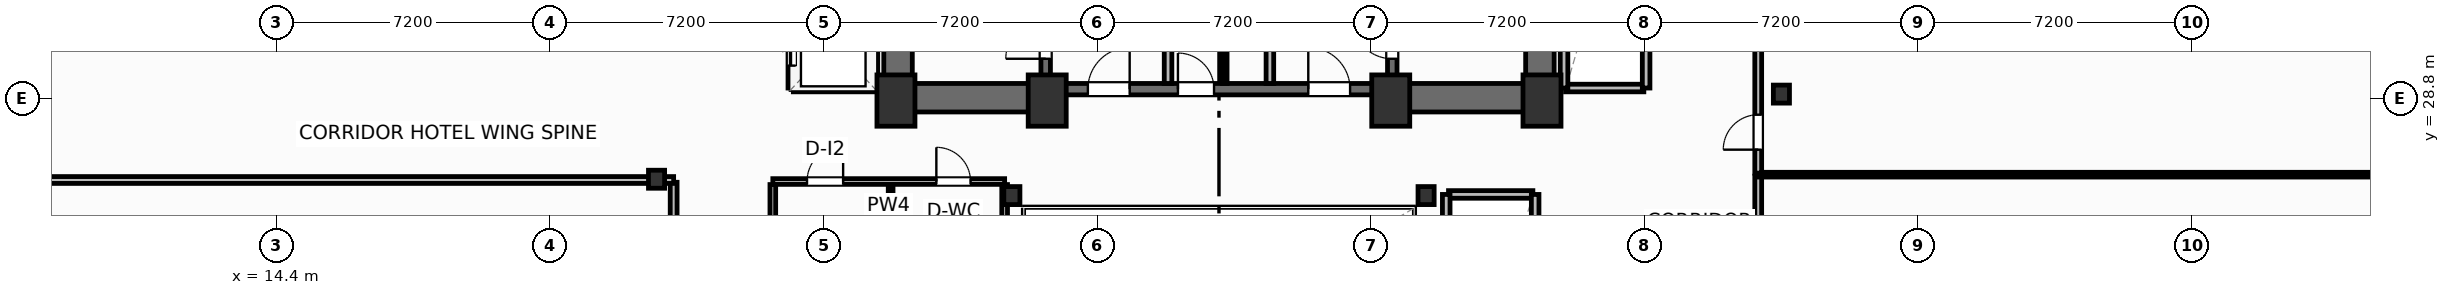
"""IFC4 building model, lengths in metres.
Left out: names, types, materials, properties, quantities, classifications, styles, units other than length and angle.
Written with IfcOpenShell. Run it as: python <this file> out.ifc"""

import sys

from ifc_helpers import new_model, si_unit, direction, frame, frame_2d, origin, origin_2d, place, context, subcontext, project, spatial, rectangle, i_section, extrude, element, fill, save


model = new_model("IFC4")
c1 = context("Model", 3, precision=1e-05, world=origin(), true_north=direction((0.0, 1.0)))
c2 = subcontext(c1, "Body", "Model", "MODEL_VIEW")
j1 = project(units=[si_unit("LENGTHUNIT", "METRE"), si_unit("PLANEANGLEUNIT", "RADIAN")], contexts=[c1])
p1 = place(None, origin())
s1 = spatial("IfcSite", under=j1, at=p1, CompositionType="ELEMENT")
p2 = place(p1, origin())
s2 = spatial("IfcBuilding", under=s1, at=p2, CompositionType="ELEMENT")
p3 = place(p2, frame((0.0, 0.0, 105.8)))
s3 = spatial("IfcBuildingStorey", under=s2, at=p3, CompositionType="ELEMENT", Elevation=105.8)
for number, where, z_axis, x_axis in (
    (1, (30.7, 28.75, 0.0), (0.0, 0.0, 1.0), (1.0, 0.0, 0.0)),
    (2, (34.68, 28.75, 0.0), (0.0, 0.0, 1.0), (1.0, 0.0, 0.0)),
    (3, (43.72, 28.75, 0.0), (0.0, 0.0, 1.0), (1.0, 0.0, 0.0)),
    (4, (47.7, 28.75, 0.0), (0.0, 0.0, 1.0), (1.0, 0.0, 0.0)),
):
    element("IfcColumn", number, at=place(p3, frame(where, z_axis=z_axis, x_axis=x_axis)), inside=s3, PredefinedType="COLUMN", context=c2, shape_type="SweptSolid", body=[
        extrude(rectangle(XDim=1.0, YDim=1.35, at=origin_2d()), origin(), (0.0, 0.0, 1.0), 3.7),
    ])
for number, where, z_axis, x_axis in (
    (5, (33.75, 26.25, 0.0), (0.0, 0.0, 1.0), (1.0, 0.0, 0.0)),
    (6, (44.65, 26.25, 0.0), (0.0, 0.0, 1.0), (1.0, 0.0, 0.0)),
    (7, (24.4, 26.68, 0.0), (0.0, 0.0, 1.0), (1.0, 0.0, 0.0)),
    (8, (54.0, 28.92, 0.0), (0.0, 0.0, 1.0), (1.0, 0.0, 0.0)),
):
    element("IfcColumn", number, at=place(p3, frame(where, z_axis=z_axis, x_axis=x_axis)), inside=s3, PredefinedType="COLUMN", context=c2, shape_type="SweptSolid", body=[
        extrude(i_section(OverallWidth=0.424, OverallDepth=0.474, WebThickness=0.048, FlangeThickness=0.077, FilletRadius=0.025, at=origin_2d()), origin(), (0.0, 0.0, 1.0), 3.7),
    ])
for number, where, z_axis, x_axis in (
    (9, (30.755, 29.2, 0.0), (0.0, 0.0, 1.0), (0.0, 1.0, 0.0)),
    (10, (47.645, 29.2, 0.0), (0.0, 0.0, 1.0), (0.0, 1.0, 0.0)),
):
    element("IfcWall", number, at=place(p3, frame(where, z_axis=z_axis, x_axis=x_axis)), inside=s3, PredefinedType="SHEAR", context=c2, shape_type="SweptSolid", body=[
        extrude(rectangle(XDim=9.22, YDim=0.75, at=frame_2d((4.61, 0.0))), origin(), (0.0, 0.0, 1.0), 3.45),
    ])
p4 = place(p3, frame((30.38, 28.825, 0.0), z_axis=(0.0, 0.0, 1.0), x_axis=(1.0, 0.0, 0.0)))
e11 = element("IfcWall", 11, at=p4, inside=s3, PredefinedType="SHEAR", context=c2, shape_type="SweptSolid", body=[
    extrude(rectangle(XDim=4.42, YDim=0.75, at=frame_2d((2.21, 0.0))), origin(), (0.0, 0.0, 1.0), 3.45),
])
p5 = place(p3, frame((43.6, 28.825, 0.0), z_axis=(0.0, 0.0, 1.0), x_axis=(1.0, 0.0, 0.0)))
e12 = element("IfcWall", 12, at=p5, inside=s3, PredefinedType="SHEAR", context=c2, shape_type="SweptSolid", body=[
    extrude(rectangle(XDim=4.42, YDim=0.75, at=frame_2d((2.21, 0.0))), origin(), (0.0, 0.0, 1.0), 3.45),
])
p6 = place(p3, frame((34.8, 29.05, 0.0), z_axis=(0.0, 0.0, 1.0), x_axis=(1.0, 0.0, 0.0)))
e13 = element("IfcWall", 13, at=p6, inside=s3, PredefinedType="SHEAR", context=c2, shape_type="SweptSolid", body=[
    extrude(rectangle(XDim=8.8, YDim=0.3, at=frame_2d((4.4, 0.0))), origin(), (0.0, 0.0, 1.0), 3.45),
])
p7 = place(p6, frame((0.95, 0.0, 0.0)))
e14 = element("IfcOpeningElement", 14, at=p7, cuts=e13, PredefinedType="OPENING", context=c2, shape_type="SweptSolid", body=[
    extrude(rectangle(XDim=1.1, YDim=2.15, at=frame_2d((0.55, 1.075))), frame((0.0, 0.16, 0.0), z_axis=(0.0, -1.0, 0.0), x_axis=(1.0, 0.0, 0.0)), (0.0, 0.0, 1.0), 0.32),
])
p8 = place(p6, frame((6.75, 0.0, 0.0)))
e15 = element("IfcOpeningElement", 15, at=p8, cuts=e13, PredefinedType="OPENING", context=c2, shape_type="SweptSolid", body=[
    extrude(rectangle(XDim=1.1, YDim=2.15, at=frame_2d((0.55, 1.075))), frame((0.0, 0.16, 0.0), z_axis=(0.0, -1.0, 0.0), x_axis=(1.0, 0.0, 0.0)), (0.0, 0.0, 1.0), 0.32),
])
p9 = place(p6, frame((3.32, 0.0, 0.0)))
e16 = element("IfcOpeningElement", 16, at=p9, cuts=e13, PredefinedType="OPENING", context=c2, shape_type="SweptSolid", body=[
    extrude(rectangle(XDim=0.95, YDim=2.15, at=frame_2d((0.475, 1.075))), frame((0.0, 0.16, 0.0), z_axis=(0.0, -1.0, 0.0), x_axis=(1.0, 0.0, 0.0)), (0.0, 0.0, 1.0), 0.32),
])
p10 = place(p3, frame((34.64, 29.2, 0.0), z_axis=(0.0, 0.0, 1.0), x_axis=(0.0, 1.0, 0.0)))
e17 = element("IfcWall", 17, at=p10, inside=s3, PredefinedType="SHEAR", context=c2, shape_type="SweptSolid", body=[
    extrude(rectangle(XDim=9.22, YDim=0.25, at=frame_2d((4.61, 0.0))), origin(), (0.0, 0.0, 1.0), 3.45),
])
p11 = place(p10, frame((0.65, 0.0, 0.0)))
e18 = element("IfcOpeningElement", 18, at=p11, cuts=e17, PredefinedType="OPENING", context=c2, shape_type="SweptSolid", body=[
    extrude(rectangle(XDim=1.05, YDim=2.15, at=frame_2d((0.525, 1.075))), frame((0.0, 0.135, 0.0), z_axis=(0.0, -1.0, 0.0), x_axis=(1.0, 0.0, 0.0)), (0.0, 0.0, 1.0), 0.27),
])
p12 = place(p3, frame((43.76, 29.2, 0.0), z_axis=(0.0, 0.0, 1.0), x_axis=(0.0, 1.0, 0.0)))
e19 = element("IfcWall", 19, at=p12, inside=s3, PredefinedType="SHEAR", context=c2, shape_type="SweptSolid", body=[
    extrude(rectangle(XDim=9.22, YDim=0.25, at=frame_2d((4.61, 0.0))), origin(), (0.0, 0.0, 1.0), 3.45),
])
p13 = place(p12, frame((0.65, 0.0, 0.0)))
e20 = element("IfcOpeningElement", 20, at=p13, cuts=e19, PredefinedType="OPENING", context=c2, shape_type="SweptSolid", body=[
    extrude(rectangle(XDim=1.05, YDim=2.15, at=frame_2d((0.525, 1.075))), frame((0.0, 0.135, 0.0), z_axis=(0.0, -1.0, 0.0), x_axis=(1.0, 0.0, 0.0)), (0.0, 0.0, 1.0), 0.27),
])
p14 = place(p3, frame((24.85, 23.03, 0.0), z_axis=(0.0, 0.0, 1.0), x_axis=(0.0, 1.0, 0.0)))
e21 = element("IfcWall", 21, at=p14, inside=s3, PredefinedType="PARTITIONING", context=c2, shape_type="SweptSolid", body=[
    extrude(rectangle(XDim=3.57, YDim=0.18, at=frame_2d((1.785, 0.0))), origin(), (0.0, 0.0, 1.0), 3.45),
])
p15 = place(p14, frame((1.5, 0.0, 0.0)))
e22 = element("IfcOpeningElement", 22, at=p15, cuts=e21, PredefinedType="OPENING", context=c2, shape_type="SweptSolid", body=[
    extrude(rectangle(XDim=0.92, YDim=2.05, at=frame_2d((0.46, 1.025))), frame((0.0, 0.1, 0.0), z_axis=(0.0, -1.0, 0.0), x_axis=(1.0, 0.0, 0.0)), (0.0, 0.0, 1.0), 0.2),
])
p16 = place(p3, frame((-0.086, 26.66, 0.0), z_axis=(0.0, 0.0, 1.0), x_axis=(1.0, 0.0, 0.0)))
e23 = element("IfcWall", 23, at=p16, inside=s3, PredefinedType="PARTITIONING", context=c2, shape_type="SweptSolid", body=[
    extrude(rectangle(XDim=24.936, YDim=0.18, at=frame_2d((12.468, 0.0))), origin(), (0.0, 0.0, 1.0), 2.662),
])
p17 = place(p3, frame((53.39, 19.24, 0.0), z_axis=(0.0, 0.0, 1.0), x_axis=(0.0, 1.0, 0.0)))
e24 = element("IfcWall", 24, at=p17, inside=s3, PredefinedType="PARTITIONING", context=c2, shape_type="SweptSolid", body=[
    extrude(rectangle(XDim=7.52, YDim=0.18, at=frame_2d((3.76, 0.0))), origin(), (0.0, 0.0, 1.0), 3.45),
])
p18 = place(p17, frame((2.1, 0.0, 0.0)))
e25 = element("IfcOpeningElement", 25, at=p18, cuts=e24, PredefinedType="OPENING", context=c2, shape_type="SweptSolid", body=[
    extrude(rectangle(XDim=0.92, YDim=2.05, at=frame_2d((0.46, 1.025))), frame((0.0, 0.1, 0.0), z_axis=(0.0, -1.0, 0.0), x_axis=(1.0, 0.0, 0.0)), (0.0, 0.0, 1.0), 0.2),
])
p19 = place(p3, frame((53.39, 26.8, 0.0), z_axis=(0.0, 0.0, 1.0), x_axis=(1.0, 0.0, 0.0)))
e26 = element("IfcWall", 26, at=p19, inside=s3, PredefinedType="PARTITIONING", context=c2, shape_type="SweptSolid", body=[
    extrude(rectangle(XDim=23.61, YDim=0.125, at=frame_2d((11.805, 0.0))), origin(), (0.0, 0.0, 1.0), 3.45),
])
p20 = place(p3, frame((53.39, 26.84, 0.0), z_axis=(0.0, 0.0, 1.0), x_axis=(0.0, 1.0, 0.0)))
e27 = element("IfcWall", 27, at=p20, inside=s3, PredefinedType="PARTITIONING", context=c2, shape_type="SweptSolid", body=[
    extrude(rectangle(XDim=12.46, YDim=0.18, at=frame_2d((6.23, 0.0))), origin(), (0.0, 0.0, 1.0), 3.45),
])
p21 = place(p20, frame((0.618, 0.0, 0.0)))
e28 = element("IfcOpeningElement", 28, at=p21, cuts=e27, PredefinedType="OPENING", context=c2, shape_type="SweptSolid", body=[
    extrude(rectangle(XDim=0.92, YDim=2.05, at=frame_2d((0.46, 1.025))), frame((0.0, 0.1, 0.0), z_axis=(0.0, -1.0, 0.0), x_axis=(1.0, 0.0, 0.0)), (0.0, 0.0, 1.0), 0.2),
])
for number, where, z_axis, x_axis in (
    (29, (37.86, 29.2, 0.0), (0.0, 0.0, 1.0), (0.0, 1.0, 0.0)),
    (30, (40.54, 29.2, 0.0), (0.0, 0.0, 1.0), (0.0, 1.0, 0.0)),
):
    element("IfcWall", number, at=place(p3, frame(where, z_axis=z_axis, x_axis=x_axis)), inside=s3, PredefinedType="PARTITIONING", context=c2, shape_type="SweptSolid", body=[
        extrude(rectangle(XDim=5.18, YDim=0.2, at=frame_2d((2.59, 0.0))), origin(), (0.0, 0.0, 1.0), 3.45),
    ])
p22 = place(p3, frame((39.35, 29.2, 0.0), z_axis=(0.0, 0.0, 1.0), x_axis=(0.0, 1.0, 0.0)))
e31 = element("IfcWall", 31, at=p22, inside=s3, PredefinedType="PARTITIONING", context=c2, shape_type="SweptSolid", body=[
    extrude(rectangle(XDim=5.22, YDim=0.125, at=frame_2d((2.61, 0.0))), origin(), (0.0, 0.0, 1.0), 3.45),
])
p23 = place(p22, frame((2.05, 0.0, 0.0)))
e32 = element("IfcOpeningElement", 32, at=p23, cuts=e31, PredefinedType="OPENING", context=c2, shape_type="SweptSolid", body=[
    extrude(rectangle(XDim=0.85, YDim=2.05, at=frame_2d((0.425, 1.025))), frame((0.0, 0.073, 0.0), z_axis=(0.0, -1.0, 0.0), x_axis=(1.0, 0.0, 0.0)), (0.0, 0.0, 1.0), 0.145),
])
p24 = place(p3, frame((27.46, 26.62, 0.0), z_axis=(0.0, 0.0, 1.0), x_axis=(1.0, 0.0, 0.0)))
e33 = element("IfcWall", 33, at=p24, inside=s3, PredefinedType="PARTITIONING", context=c2, shape_type="SweptSolid", body=[
    extrude(rectangle(XDim=6.1, YDim=0.15, at=frame_2d((3.05, 0.0))), origin(), (0.0, 0.0, 1.0), 2.662),
])
p25 = place(p24, frame((0.9, 0.0, 0.0)))
e34 = element("IfcOpeningElement", 34, at=p25, cuts=e33, PredefinedType="OPENING", context=c2, shape_type="SweptSolid", body=[
    extrude(rectangle(XDim=0.95, YDim=2.05, at=frame_2d((0.475, 1.025))), frame((0.0, 0.085, 0.0), z_axis=(0.0, -1.0, 0.0), x_axis=(1.0, 0.0, 0.0)), (0.0, 0.0, 1.0), 0.17),
])
p26 = place(p24, frame((4.303, 0.0, 0.0)))
e35 = element("IfcOpeningElement", 35, at=p26, cuts=e33, PredefinedType="OPENING", context=c2, shape_type="SweptSolid", body=[
    extrude(rectangle(XDim=0.9, YDim=2.05, at=frame_2d((0.45, 1.025))), frame((0.0, 0.085, 0.0), z_axis=(0.0, -1.0, 0.0), x_axis=(1.0, 0.0, 0.0)), (0.0, 0.0, 1.0), 0.17),
])
p27 = place(p3, frame((30.56, 19.38, 0.0), z_axis=(0.0, 0.0, 1.0), x_axis=(0.0, 1.0, 0.0)))
e36 = element("IfcWall", 36, at=p27, inside=s3, PredefinedType="PARTITIONING", context=c2, shape_type="SweptSolid", body=[
    extrude(rectangle(XDim=7.16, YDim=0.125, at=frame_2d((3.58, 0.0))), origin(), (0.0, 0.0, 1.0), 3.45),
])
p28 = place(p27, frame((1.4, 0.0, 0.0)))
e37 = element("IfcOpeningElement", 37, at=p28, cuts=e36, PredefinedType="OPENING", context=c2, shape_type="SweptSolid", body=[
    extrude(rectangle(XDim=0.92, YDim=2.05, at=frame_2d((0.46, 1.025))), frame((0.0, 0.073, 0.0), z_axis=(0.0, -1.0, 0.0), x_axis=(1.0, 0.0, 0.0)), (0.0, 0.0, 1.0), 0.145),
])
p29 = place(p3, frame((27.46, 19.38, 0.0), z_axis=(0.0, 0.0, 1.0), x_axis=(0.0, 1.0, 0.0)))
e38 = element("IfcWall", 38, at=p29, inside=s3, PredefinedType="PARTITIONING", context=c2, shape_type="SweptSolid", body=[
    extrude(rectangle(XDim=7.16, YDim=0.15, at=frame_2d((3.58, 0.0))), origin(), (0.0, 0.0, 1.0), 3.45),
])
p30 = place(p3, frame((33.56, 19.38, 0.0), z_axis=(0.0, 0.0, 1.0), x_axis=(0.0, 1.0, 0.0)))
e39 = element("IfcWall", 39, at=p30, inside=s3, PredefinedType="PARTITIONING", context=c2, shape_type="SweptSolid", body=[
    extrude(rectangle(XDim=7.16, YDim=0.15, at=frame_2d((3.58, 0.0))), origin(), (0.0, 0.0, 1.0), 2.824),
])
p31 = place(p3, frame((28.0, 29.08, 0.0), z_axis=(0.0, 0.0, 1.0), x_axis=(1.0, 0.0, 0.0)))
e40 = element("IfcWall", 40, at=p31, inside=s3, PredefinedType="PARTITIONING", context=c2, shape_type="SweptSolid", body=[
    extrude(rectangle(XDim=2.1, YDim=0.2, at=frame_2d((1.05, 0.0))), origin(), (0.0, 0.0, 1.0), 3.45),
])
p32 = place(p3, frame((30.12, 29.08, 0.0), z_axis=(0.0, 0.0, 1.0), x_axis=(0.0, 1.0, 0.0)))
e41 = element("IfcWall", 41, at=p32, inside=s3, PredefinedType="PARTITIONING", context=c2, shape_type="SweptSolid", body=[
    extrude(rectangle(XDim=6.89, YDim=0.2, at=frame_2d((3.445, 0.0))), origin(), (0.0, 0.0, 1.0), 3.45),
])
p33 = place(p3, frame((27.96, 29.08, 0.0), z_axis=(0.0, 0.0, 1.0), x_axis=(0.0, 1.0, 0.0)))
e42 = element("IfcWall", 42, at=p33, inside=s3, PredefinedType="PARTITIONING", context=c2, shape_type="SweptSolid", body=[
    extrude(rectangle(XDim=6.89, YDim=0.2, at=frame_2d((3.445, 0.0))), origin(), (0.0, 0.0, 1.0), 3.45),
])
p34 = place(p33, frame((0.59, 0.0, 0.0)))
e43 = element("IfcOpeningElement", 43, at=p34, cuts=e42, PredefinedType="OPENING", context=c2, shape_type="SweptSolid", body=[
    extrude(rectangle(XDim=1.1, YDim=2.15, at=frame_2d((0.55, 1.075))), frame((0.0, 0.11, 0.0), z_axis=(0.0, -1.0, 0.0), x_axis=(1.0, 0.0, 0.0)), (0.0, 0.0, 1.0), 0.22),
])
p35 = place(p33, frame((2.89, 0.0, 0.0)))
e44 = element("IfcOpeningElement", 44, at=p35, cuts=e42, PredefinedType="OPENING", context=c2, shape_type="SweptSolid", body=[
    extrude(rectangle(XDim=1.1, YDim=2.15, at=frame_2d((0.55, 1.075))), frame((0.0, 0.11, 0.0), z_axis=(0.0, -1.0, 0.0), x_axis=(1.0, 0.0, 0.0)), (0.0, 0.0, 1.0), 0.22),
])
p36 = place(p33, frame((5.19, 0.0, 0.0)))
e45 = element("IfcOpeningElement", 45, at=p36, cuts=e42, PredefinedType="OPENING", context=c2, shape_type="SweptSolid", body=[
    extrude(rectangle(XDim=1.1, YDim=2.15, at=frame_2d((0.55, 1.075))), frame((0.0, 0.11, 0.0), z_axis=(0.0, -1.0, 0.0), x_axis=(1.0, 0.0, 0.0)), (0.0, 0.0, 1.0), 0.22),
])
p37 = place(p3, frame((48.32, 29.08, 0.0), z_axis=(0.0, 0.0, 1.0), x_axis=(1.0, 0.0, 0.0)))
e46 = element("IfcWall", 46, at=p37, inside=s3, PredefinedType="PARTITIONING", context=c2, shape_type="SweptSolid", body=[
    extrude(rectangle(XDim=2.06, YDim=0.2, at=frame_2d((1.03, 0.0))), origin(), (0.0, 0.0, 1.0), 2.662),
])
for number, where, z_axis, x_axis in (
    (47, (48.28, 29.08, 0.0), (0.0, 0.0, 1.0), (0.0, 1.0, 0.0)),
    (48, (50.44, 29.08, 0.0), (0.0, 0.0, 1.0), (0.0, 1.0, 0.0)),
):
    element("IfcWall", number, at=place(p3, frame(where, z_axis=z_axis, x_axis=x_axis)), inside=s3, PredefinedType="PARTITIONING", context=c2, shape_type="SweptSolid", body=[
        extrude(rectangle(XDim=6.89, YDim=0.2, at=frame_2d((3.445, 0.0))), origin(), (0.0, 0.0, 1.0), 3.45),
    ])
p38 = place(p3, frame((45.24, 26.28, 0.0), z_axis=(0.0, 0.0, 1.0), x_axis=(1.0, 0.0, 0.0)))
e49 = element("IfcWall", 49, at=p38, inside=s3, PredefinedType="PARTITIONING", context=c2, shape_type="SweptSolid", body=[
    extrude(rectangle(XDim=2.22, YDim=0.2, at=frame_2d((1.11, 0.0))), origin(), (0.0, 0.0, 1.0), 3.45),
])
for number, where, z_axis, x_axis in (
    (50, (45.18, 19.38, 0.0), (0.0, 0.0, 1.0), (0.0, 1.0, 0.0)),
    (51, (47.52, 19.38, 0.0), (0.0, 0.0, 1.0), (0.0, 1.0, 0.0)),
):
    element("IfcWall", number, at=place(p3, frame(where, z_axis=z_axis, x_axis=x_axis)), inside=s3, PredefinedType="PARTITIONING", context=c2, shape_type="SweptSolid", body=[
        extrude(rectangle(XDim=6.9, YDim=0.2, at=frame_2d((3.45, 0.0))), origin(), (0.0, 0.0, 1.0), 3.45),
    ])
p39 = place(p21, origin())
e52 = element("IfcDoor", 52, at=p39, inside=s3, OperationType="SINGLE_SWING_LEFT", PredefinedType="DOOR", context=c2, shape_type="SweptSolid", body=[
    extrude(rectangle(XDim=0.92, YDim=2.05, at=frame_2d((0.46, 1.025))), frame((0.0, 0.025, 0.0), z_axis=(0.0, -1.0, 0.0), x_axis=(1.0, 0.0, 0.0)), (0.0, 0.0, 1.0), 0.05),
])
fill(e28, e52)
p40 = place(p11, origin())
e53 = element("IfcDoor", 53, at=p40, inside=s3, OperationType="SINGLE_SWING_LEFT", PredefinedType="DOOR", context=c2, shape_type="SweptSolid", body=[
    extrude(rectangle(XDim=1.05, YDim=2.15, at=frame_2d((0.525, 1.075))), frame((0.0, 0.025, 0.0), z_axis=(0.0, -1.0, 0.0), x_axis=(1.0, 0.0, 0.0)), (0.0, 0.0, 1.0), 0.05),
])
fill(e18, e53)
p41 = place(p13, origin())
e54 = element("IfcDoor", 54, at=p41, inside=s3, OperationType="SINGLE_SWING_RIGHT", PredefinedType="DOOR", context=c2, shape_type="SweptSolid", body=[
    extrude(rectangle(XDim=1.05, YDim=2.15, at=frame_2d((0.525, 1.075))), frame((0.0, 0.025, 0.0), z_axis=(0.0, -1.0, 0.0), x_axis=(1.0, 0.0, 0.0)), (0.0, 0.0, 1.0), 0.05),
])
fill(e20, e54)
p42 = place(p7, origin())
e55 = element("IfcDoor", 55, at=p42, inside=s3, OperationType="SINGLE_SWING_RIGHT", PredefinedType="DOOR", context=c2, shape_type="SweptSolid", body=[
    extrude(rectangle(XDim=1.1, YDim=2.15, at=frame_2d((0.55, 1.075))), frame((0.0, 0.025, 0.0), z_axis=(0.0, -1.0, 0.0), x_axis=(1.0, 0.0, 0.0)), (0.0, 0.0, 1.0), 0.05),
])
fill(e14, e55)
p43 = place(p8, origin())
e56 = element("IfcDoor", 56, at=p43, inside=s3, OperationType="SINGLE_SWING_LEFT", PredefinedType="DOOR", context=c2, shape_type="SweptSolid", body=[
    extrude(rectangle(XDim=1.1, YDim=2.15, at=frame_2d((0.55, 1.075))), frame((0.0, 0.025, 0.0), z_axis=(0.0, -1.0, 0.0), x_axis=(1.0, 0.0, 0.0)), (0.0, 0.0, 1.0), 0.05),
])
fill(e15, e56)
p44 = place(p9, origin())
e57 = element("IfcDoor", 57, at=p44, inside=s3, OperationType="SINGLE_SWING_LEFT", PredefinedType="DOOR", context=c2, shape_type="SweptSolid", body=[
    extrude(rectangle(XDim=0.95, YDim=2.15, at=frame_2d((0.475, 1.075))), frame((0.0, 0.025, 0.0), z_axis=(0.0, -1.0, 0.0), x_axis=(1.0, 0.0, 0.0)), (0.0, 0.0, 1.0), 0.05),
])
fill(e16, e57)
p45 = place(p25, origin())
e58 = element("IfcDoor", 58, at=p45, inside=s3, OperationType="SINGLE_SWING_RIGHT", PredefinedType="DOOR", context=c2, shape_type="SweptSolid", body=[
    extrude(rectangle(XDim=0.95, YDim=2.05, at=frame_2d((0.475, 1.025))), frame((0.0, 0.025, 0.0), z_axis=(0.0, -1.0, 0.0), x_axis=(1.0, 0.0, 0.0)), (0.0, 0.0, 1.0), 0.05),
])
fill(e34, e58)
p46 = place(p26, origin())
e59 = element("IfcDoor", 59, at=p46, inside=s3, OperationType="SINGLE_SWING_LEFT", PredefinedType="DOOR", context=c2, shape_type="SweptSolid", body=[
    extrude(rectangle(XDim=0.9, YDim=2.05, at=frame_2d((0.45, 1.025))), frame((0.0, 0.025, 0.0), z_axis=(0.0, -1.0, 0.0), x_axis=(1.0, 0.0, 0.0)), (0.0, 0.0, 1.0), 0.05),
])
fill(e35, e59)
p47 = place(p34, origin())
e60 = element("IfcDoor", 60, at=p47, inside=s3, OperationType="SLIDING_TO_LEFT", PredefinedType="DOOR", context=c2, shape_type="SweptSolid", body=[
    extrude(rectangle(XDim=1.1, YDim=2.15, at=frame_2d((0.55, 1.075))), frame((0.0, 0.025, 0.0), z_axis=(0.0, -1.0, 0.0), x_axis=(1.0, 0.0, 0.0)), (0.0, 0.0, 1.0), 0.05),
])
fill(e43, e60)
save(model, sys.argv[1])
